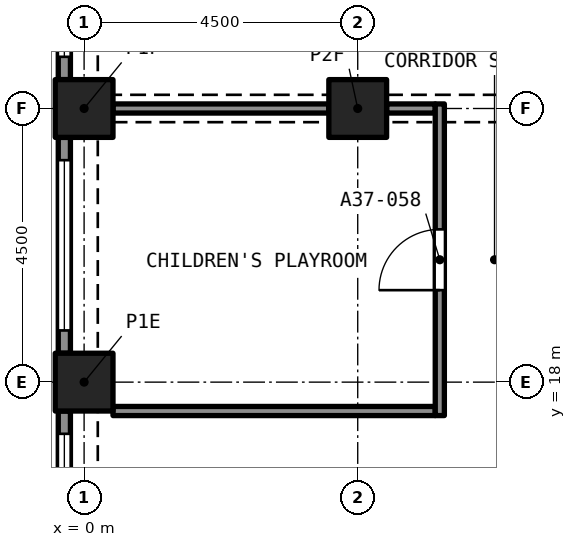
"""IFC4 building model, lengths in metres.
Left out: names, types, materials, properties, quantities, classifications, styles, units other than length and angle.
Written with IfcOpenShell. Run it as: python <this file> out.ifc"""

import sys

from ifc_helpers import new_model, si_unit, direction, frame, frame_2d, origin, origin_2d, place, context, subcontext, project, spatial, rectangle, extrude, element, fill, save


model = new_model("IFC4")
c1 = context("Model", 3, precision=1e-05, world=origin(), true_north=direction((0.0, 1.0)))
c2 = subcontext(c1, "Body", "Model", "MODEL_VIEW")
j1 = project(units=[si_unit("LENGTHUNIT", "METRE"), si_unit("PLANEANGLEUNIT", "RADIAN")], contexts=[c1])
p1 = place(None, origin())
s1 = spatial("IfcSite", under=j1, at=p1, CompositionType="ELEMENT")
p2 = place(p1, origin())
s2 = spatial("IfcBuilding", under=s1, at=p2, CompositionType="ELEMENT")
p3 = place(p2, frame((0.0, 0.0, 133.4)))
s3 = spatial("IfcBuildingStorey", under=s2, at=p3, CompositionType="ELEMENT", Elevation=133.4)
for number, where, z_axis, x_axis in (
    (1, (0.0, 18.0, 0.0), (0.0, 0.0, 1.0), (1.0, 0.0, 0.0)),
    (2, (0.0, 22.5, 0.0), (0.0, 0.0, 1.0), (1.0, 0.0, 0.0)),
    (3, (4.5, 22.5, 0.0), (0.0, 0.0, 1.0), (1.0, 0.0, 0.0)),
):
    element("IfcColumn", number, at=place(p3, frame(where, z_axis=z_axis, x_axis=x_axis)), inside=s3, PredefinedType="COLUMN", context=c2, shape_type="SweptSolid", body=[
        extrude(rectangle(XDim=0.95, YDim=0.95, at=origin_2d()), origin(), (0.0, 0.0, 1.0), 3.2),
    ])
p4 = place(p3, frame((-0.325, 22.975, 0.0), z_axis=(0.0, 0.0, 1.0), x_axis=(0.0, 1.0, 0.0)))
e4 = element("IfcWall", 4, at=p4, inside=s3, PredefinedType="SOLIDWALL", context=c2, shape_type="SweptSolid", body=[
    extrude(rectangle(XDim=3.55, YDim=0.2, at=frame_2d((1.775, 0.0))), origin(), (0.0, 0.0, 1.0), 3.2),
])
p5 = place(p4, frame((0.375, 0.0, 0.45)))
e5 = element("IfcOpeningElement", 5, at=p5, cuts=e4, PredefinedType="OPENING", context=c2, shape_type="SweptSolid", body=[
    extrude(rectangle(XDim=2.8, YDim=1.95, at=frame_2d((1.4, 0.975))), frame((0.0, 0.11, 0.0), z_axis=(0.0, -1.0, 0.0), x_axis=(1.0, 0.0, 0.0)), (0.0, 0.0, 1.0), 0.22),
])
p6 = place(p3, frame((-0.325, 18.475, 0.0), z_axis=(0.0, 0.0, 1.0), x_axis=(0.0, 1.0, 0.0)))
e6 = element("IfcWall", 6, at=p6, inside=s3, PredefinedType="SOLIDWALL", context=c2, shape_type="SweptSolid", body=[
    extrude(rectangle(XDim=3.55, YDim=0.2, at=frame_2d((1.775, 0.0))), origin(), (0.0, 0.0, 1.0), 3.2),
])
p7 = place(p6, frame((0.375, 0.0, 0.45)))
e7 = element("IfcOpeningElement", 7, at=p7, cuts=e6, PredefinedType="OPENING", context=c2, shape_type="SweptSolid", body=[
    extrude(rectangle(XDim=2.8, YDim=1.95, at=frame_2d((1.4, 0.975))), frame((0.0, 0.11, 0.0), z_axis=(0.0, -1.0, 0.0), x_axis=(1.0, 0.0, 0.0)), (0.0, 0.0, 1.0), 0.22),
])
p8 = place(p3, frame((-0.325, 13.975, 0.0), z_axis=(0.0, 0.0, 1.0), x_axis=(0.0, 1.0, 0.0)))
e8 = element("IfcWall", 8, at=p8, inside=s3, PredefinedType="SOLIDWALL", context=c2, shape_type="SweptSolid", body=[
    extrude(rectangle(XDim=3.55, YDim=0.2, at=frame_2d((1.775, 0.0))), origin(), (0.0, 0.0, 1.0), 3.2),
])
p9 = place(p8, frame((0.375, 0.0, 0.45)))
e9 = element("IfcOpeningElement", 9, at=p9, cuts=e8, PredefinedType="OPENING", context=c2, shape_type="SweptSolid", body=[
    extrude(rectangle(XDim=2.8, YDim=1.95, at=frame_2d((1.4, 0.975))), frame((0.0, 0.11, 0.0), z_axis=(0.0, -1.0, 0.0), x_axis=(1.0, 0.0, 0.0)), (0.0, 0.0, 1.0), 0.22),
])
p10 = place(p3, frame((0.475, 17.525, 0.0), z_axis=(0.0, 0.0, 1.0), x_axis=(1.0, 0.0, 0.0)))
e10 = element("IfcWall", 10, at=p10, inside=s3, PredefinedType="PARTITIONING", context=c2, shape_type="SweptSolid", body=[
    extrude(rectangle(XDim=5.3, YDim=0.15, at=frame_2d((2.65, 0.0))), origin(), (0.0, 0.0, 1.0), 2.9),
])
p11 = place(p3, frame((4.975, 22.5, 0.0), z_axis=(0.0, 0.0, 1.0), x_axis=(1.0, 0.0, 0.0)))
e11 = element("IfcWall", 11, at=p11, inside=s3, PredefinedType="PARTITIONING", context=c2, shape_type="SweptSolid", body=[
    extrude(rectangle(XDim=0.8, YDim=0.15, at=frame_2d((0.4, 0.0))), origin(), (0.0, 0.0, 1.0), 2.38),
])
p12 = place(p3, frame((0.475, 22.5, 0.0), z_axis=(0.0, 0.0, 1.0), x_axis=(1.0, 0.0, 0.0)))
e12 = element("IfcWall", 12, at=p12, inside=s3, PredefinedType="PARTITIONING", context=c2, shape_type="SweptSolid", body=[
    extrude(rectangle(XDim=3.55, YDim=0.15, at=frame_2d((1.775, 0.0))), origin(), (0.0, 0.0, 1.0), 2.38),
])
p13 = place(p3, frame((5.85, 17.45, 0.0), z_axis=(0.0, 0.0, 1.0), x_axis=(0.0, 1.0, 0.0)))
e13 = element("IfcWall", 13, at=p13, inside=s3, PredefinedType="PARTITIONING", context=c2, shape_type="SweptSolid", body=[
    extrude(rectangle(XDim=5.125, YDim=0.15, at=frame_2d((2.562, 0.0))), origin(), (0.0, 0.0, 1.0), 2.9),
])
p14 = place(p13, frame((2.062, 0.0, 0.0)))
e14 = element("IfcOpeningElement", 14, at=p14, cuts=e13, PredefinedType="OPENING", context=c2, shape_type="SweptSolid", body=[
    extrude(rectangle(XDim=1.0, YDim=2.1, at=frame_2d((0.5, 1.05))), frame((0.0, 0.085, 0.0), z_axis=(0.0, -1.0, 0.0), x_axis=(1.0, 0.0, 0.0)), (0.0, 0.0, 1.0), 0.17),
])
p15 = place(p5, origin())
e15 = element("IfcWindow", 15, at=p15, inside=s3, PartitioningType="SINGLE_PANEL", PredefinedType="WINDOW", context=c2, shape_type="SweptSolid", body=[
    extrude(rectangle(XDim=2.8, YDim=1.95, at=frame_2d((1.4, 0.975))), frame((0.0, 0.03, 0.0), z_axis=(0.0, -1.0, 0.0), x_axis=(1.0, 0.0, 0.0)), (0.0, 0.0, 1.0), 0.06),
])
fill(e5, e15)
p16 = place(p7, origin())
e16 = element("IfcWindow", 16, at=p16, inside=s3, PartitioningType="SINGLE_PANEL", PredefinedType="WINDOW", context=c2, shape_type="SweptSolid", body=[
    extrude(rectangle(XDim=2.8, YDim=1.95, at=frame_2d((1.4, 0.975))), frame((0.0, 0.03, 0.0), z_axis=(0.0, -1.0, 0.0), x_axis=(1.0, 0.0, 0.0)), (0.0, 0.0, 1.0), 0.06),
])
fill(e7, e16)
p17 = place(p9, origin())
e17 = element("IfcWindow", 17, at=p17, inside=s3, PartitioningType="SINGLE_PANEL", PredefinedType="WINDOW", context=c2, shape_type="SweptSolid", body=[
    extrude(rectangle(XDim=2.8, YDim=1.95, at=frame_2d((1.4, 0.975))), frame((0.0, 0.03, 0.0), z_axis=(0.0, -1.0, 0.0), x_axis=(1.0, 0.0, 0.0)), (0.0, 0.0, 1.0), 0.06),
])
fill(e9, e17)
p18 = place(p14, origin())
e18 = element("IfcDoor", 18, at=p18, inside=s3, OperationType="SINGLE_SWING_RIGHT", PredefinedType="DOOR", context=c2, shape_type="SweptSolid", body=[
    extrude(rectangle(XDim=1.0, YDim=2.1, at=frame_2d((0.5, 1.05))), frame((0.0, 0.025, 0.0), z_axis=(0.0, -1.0, 0.0), x_axis=(1.0, 0.0, 0.0)), (0.0, 0.0, 1.0), 0.05),
])
fill(e14, e18)
save(model, sys.argv[1])
